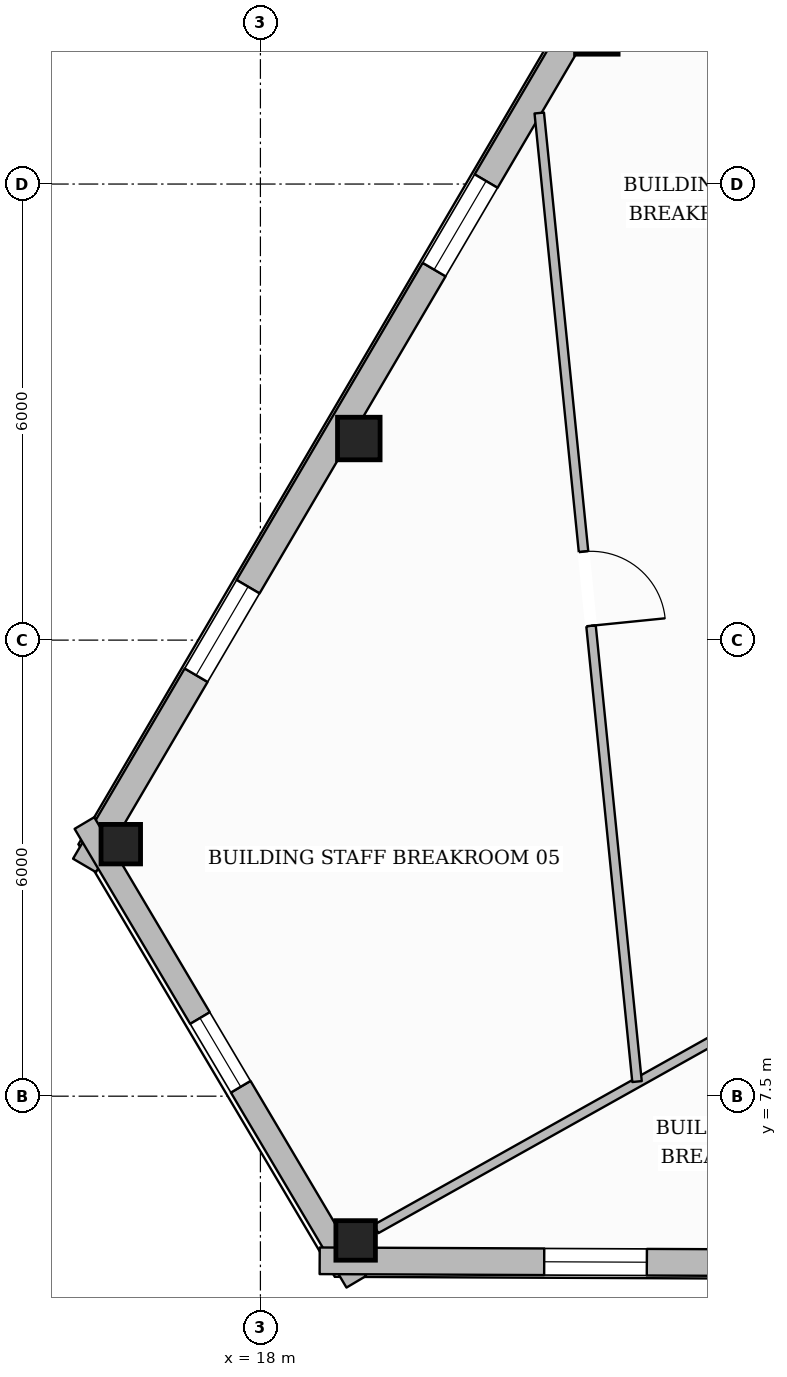
"""IFC4 building model, lengths in metres.
Left out: names, types, materials, properties, quantities, classifications, styles, units other than length and angle.
Written with IfcOpenShell. Run it as: python <this file> out.ifc"""

import sys

from ifc_helpers import new_model, si_unit, direction, frame, frame_2d, origin, origin_2d, place, context, subcontext, project, spatial, rectangle, hollow_rectangle, extrude, element, fill, save


model = new_model("IFC4")
c1 = context("Model", 3, precision=1e-05, world=origin(), true_north=direction((0.0, 1.0)))
c2 = subcontext(c1, "Body", "Model", "MODEL_VIEW")
j1 = project(units=[si_unit("LENGTHUNIT", "METRE"), si_unit("PLANEANGLEUNIT", "RADIAN")], contexts=[c1])
p1 = place(None, origin())
s1 = spatial("IfcSite", under=j1, at=p1, CompositionType="ELEMENT")
p2 = place(p1, origin())
s2 = spatial("IfcBuilding", under=s1, at=p2, CompositionType="ELEMENT")
p3 = place(p2, frame((0.0, 0.0, 270.3)))
s3 = spatial("IfcBuildingStorey", under=s2, at=p3, CompositionType="ELEMENT", Elevation=270.3)
for number, where, z_axis, x_axis in (
    (1, (22.426, 21.489, 0.0), (0.0, 0.0, 1.0), (1.0, 0.0, 0.0)),
    (2, (19.295, 16.152, 0.0), (0.0, 0.0, 1.0), (1.0, 0.0, 0.0)),
):
    element("IfcColumn", number, at=place(p3, frame(where, z_axis=z_axis, x_axis=x_axis)), inside=s3, PredefinedType="COLUMN", context=c2, shape_type="SweptSolid", body=[
        extrude(hollow_rectangle(XDim=0.56, YDim=0.56, WallThickness=0.025, at=origin_2d()), origin(), (0.0, 0.0, 1.0), 3.61),
    ])
for number, where, z_axis, x_axis in (
    (3, (16.163, 10.816, 0.0), (0.0, 0.0, 1.0), (1.0, 0.0, 0.0)),
    (4, (19.253, 5.602, 0.0), (0.0, 0.0, 1.0), (1.0, 0.0, 0.0)),
):
    element("IfcColumn", number, at=place(p3, frame(where, z_axis=z_axis, x_axis=x_axis)), inside=s3, PredefinedType="COLUMN", context=c2, shape_type="SweptSolid", body=[
        extrude(hollow_rectangle(XDim=0.52, YDim=0.52, WallThickness=0.024, at=origin_2d()), origin(), (0.0, 0.0, 1.0), 3.61),
    ])
p4 = place(p3, frame((15.686, 10.536, 0.0), z_axis=(0.0, 0.0, 1.0), x_axis=(0.506100645038, 0.862474426921, 0.0)))
e5 = element("IfcWall", 5, at=p4, inside=s3, PredefinedType="STANDARD", context=c2, shape_type="SweptSolid", body=[
    extrude(rectangle(XDim=38.084, YDim=0.35, at=frame_2d((19.042, 0.0))), origin(), (0.0, 0.0, 1.0), 3.196),
])
p5 = place(p4, frame((27.963, 0.0, 0.0)))
e6 = element("IfcOpeningElement", 6, at=p5, cuts=e5, PredefinedType="OPENING", context=c2, shape_type="SweptSolid", body=[
    extrude(rectangle(XDim=1.0, YDim=2.2, at=frame_2d((0.5, 1.1))), frame((0.0, 0.185, 0.0), z_axis=(0.0, -1.0, 0.0), x_axis=(1.0, 0.0, 0.0)), (0.0, 0.0, 1.0), 0.37),
])
p6 = place(p4, frame((33.839, 0.0, 0.65)))
e7 = element("IfcOpeningElement", 7, at=p6, cuts=e5, PredefinedType="OPENING", context=c2, shape_type="SweptSolid", body=[
    extrude(rectangle(XDim=1.35, YDim=1.75, at=frame_2d((0.675, 0.875))), frame((0.0, 0.185, 0.0), z_axis=(0.0, -1.0, 0.0), x_axis=(1.0, 0.0, 0.0)), (0.0, 0.0, 1.0), 0.37),
])
p7 = place(p4, frame((21.464, 0.0, 0.65)))
e8 = element("IfcOpeningElement", 8, at=p7, cuts=e5, PredefinedType="OPENING", context=c2, shape_type="SweptSolid", body=[
    extrude(rectangle(XDim=1.35, YDim=1.75, at=frame_2d((0.675, 0.875))), frame((0.0, 0.185, 0.0), z_axis=(0.0, -1.0, 0.0), x_axis=(1.0, 0.0, 0.0)), (0.0, 0.0, 1.0), 0.37),
])
p8 = place(p4, frame((9.089, 0.0, 0.65)))
e9 = element("IfcOpeningElement", 9, at=p8, cuts=e5, PredefinedType="OPENING", context=c2, shape_type="SweptSolid", body=[
    extrude(rectangle(XDim=1.35, YDim=1.75, at=frame_2d((0.675, 0.875))), frame((0.0, 0.185, 0.0), z_axis=(0.0, -1.0, 0.0), x_axis=(1.0, 0.0, 0.0)), (0.0, 0.0, 1.0), 0.37),
])
p9 = place(p4, frame((2.902, 0.0, 0.65)))
e10 = element("IfcOpeningElement", 10, at=p9, cuts=e5, PredefinedType="OPENING", context=c2, shape_type="SweptSolid", body=[
    extrude(rectangle(XDim=1.35, YDim=1.75, at=frame_2d((0.675, 0.875))), frame((0.0, 0.185, 0.0), z_axis=(0.0, -1.0, 0.0), x_axis=(1.0, 0.0, 0.0)), (0.0, 0.0, 1.0), 0.37),
])
p10 = place(p3, frame((19.261, 5.059, 0.0), z_axis=(0.0, 0.0, 1.0), x_axis=(-0.509846271697, 0.860265528332, 0.0)))
e11 = element("IfcWall", 11, at=p10, inside=s3, PredefinedType="STANDARD", context=c2, shape_type="SweptSolid", body=[
    extrude(rectangle(XDim=7.015, YDim=0.3, at=frame_2d((3.508, 0.0))), origin(), (0.0, 0.0, 1.0), 3.196),
])
p11 = place(p10, frame((2.983, 0.0, 0.65)))
e12 = element("IfcOpeningElement", 12, at=p11, cuts=e11, PredefinedType="OPENING", context=c2, shape_type="SweptSolid", body=[
    extrude(rectangle(XDim=1.05, YDim=1.7, at=frame_2d((0.525, 0.85))), frame((0.0, 0.16, 0.0), z_axis=(0.0, -1.0, 0.0), x_axis=(1.0, 0.0, 0.0)), (0.0, 0.0, 1.0), 0.32),
])
p12 = place(p3, frame((57.613, 5.165, 0.0), z_axis=(0.0, 0.0, 1.0), x_axis=(-0.99999050908, 0.004356805123, 0.0)))
e13 = element("IfcWall", 13, at=p12, inside=s3, PredefinedType="STANDARD", context=c2, shape_type="SweptSolid", body=[
    extrude(rectangle(XDim=38.833, YDim=0.35, at=frame_2d((19.417, 0.0))), origin(), (0.0, 0.0, 1.0), 3.196),
])
p13 = place(p12, frame((34.529, 0.0, 0.65)))
e14 = element("IfcOpeningElement", 14, at=p13, cuts=e13, PredefinedType="OPENING", context=c2, shape_type="SweptSolid", body=[
    extrude(rectangle(XDim=1.35, YDim=1.75, at=frame_2d((0.675, 0.875))), frame((0.0, 0.185, 0.0), z_axis=(0.0, -1.0, 0.0), x_axis=(1.0, 0.0, 0.0)), (0.0, 0.0, 1.0), 0.37),
])
p14 = place(p12, frame((28.215, 0.0, 0.65)))
e15 = element("IfcOpeningElement", 15, at=p14, cuts=e13, PredefinedType="OPENING", context=c2, shape_type="SweptSolid", body=[
    extrude(rectangle(XDim=1.35, YDim=1.75, at=frame_2d((0.675, 0.875))), frame((0.0, 0.185, 0.0), z_axis=(0.0, -1.0, 0.0), x_axis=(1.0, 0.0, 0.0)), (0.0, 0.0, 1.0), 0.37),
])
p15 = place(p12, frame((21.901, 0.0, 0.65)))
e16 = element("IfcOpeningElement", 16, at=p15, cuts=e13, PredefinedType="OPENING", context=c2, shape_type="SweptSolid", body=[
    extrude(rectangle(XDim=1.35, YDim=1.75, at=frame_2d((0.675, 0.875))), frame((0.0, 0.185, 0.0), z_axis=(0.0, -1.0, 0.0), x_axis=(1.0, 0.0, 0.0)), (0.0, 0.0, 1.0), 0.37),
])
p16 = place(p12, frame((9.272, 0.0, 0.65)))
e17 = element("IfcOpeningElement", 17, at=p16, cuts=e13, PredefinedType="OPENING", context=c2, shape_type="SweptSolid", body=[
    extrude(rectangle(XDim=1.35, YDim=1.75, at=frame_2d((0.675, 0.875))), frame((0.0, 0.185, 0.0), z_axis=(0.0, -1.0, 0.0), x_axis=(1.0, 0.0, 0.0)), (0.0, 0.0, 1.0), 0.37),
])
p17 = place(p12, frame((2.958, 0.0, 0.65)))
e18 = element("IfcOpeningElement", 18, at=p17, cuts=e13, PredefinedType="OPENING", context=c2, shape_type="SweptSolid", body=[
    extrude(rectangle(XDim=1.35, YDim=1.75, at=frame_2d((0.675, 0.875))), frame((0.0, 0.185, 0.0), z_axis=(0.0, -1.0, 0.0), x_axis=(1.0, 0.0, 0.0)), (0.0, 0.0, 1.0), 0.37),
])
p18 = place(p3, frame((26.01, 9.386, 0.0), z_axis=(0.0, 0.0, 1.0), x_axis=(-0.872521690704, -0.488575377246, 0.0)))
e19 = element("IfcWall", 19, at=p18, inside=s3, PredefinedType="PARTITIONING", context=c2, shape_type="SweptSolid", body=[
    extrude(rectangle(XDim=7.437, YDim=0.125, at=frame_2d((3.718, 0.0))), origin(), (0.0, 0.0, 1.0), 3.246),
])
p19 = place(p3, frame((21.669, 20.435, 0.0), z_axis=(0.0, 0.0, 1.0), x_axis=(0.100422843379, -0.994944848988, 0.0)))
e20 = element("IfcWall", 20, at=p19, inside=s3, PredefinedType="PARTITIONING", context=c2, shape_type="SweptSolid", body=[
    extrude(rectangle(XDim=12.807, YDim=0.125, at=frame_2d((6.404, 0.0))), origin(), (0.0, 0.0, 1.0), 3.349),
])
p20 = place(p19, frame((5.8, 0.0, 0.0)))
e21 = element("IfcOpeningElement", 21, at=p20, cuts=e20, PredefinedType="OPENING", context=c2, shape_type="SweptSolid", body=[
    extrude(rectangle(XDim=0.98, YDim=2.15, at=frame_2d((0.49, 1.075))), frame((0.0, 0.073, 0.0), z_axis=(0.0, -1.0, 0.0), x_axis=(1.0, 0.0, 0.0)), (0.0, 0.0, 1.0), 0.145),
])
p21 = place(p8, origin())
e22 = element("IfcWindow", 22, at=p21, inside=s3, PartitioningType="SINGLE_PANEL", PredefinedType="WINDOW", context=c2, shape_type="SweptSolid", body=[
    extrude(rectangle(XDim=1.35, YDim=1.75, at=frame_2d((0.675, 0.875))), frame((0.0, 0.03, 0.0), z_axis=(0.0, -1.0, 0.0), x_axis=(1.0, 0.0, 0.0)), (0.0, 0.0, 1.0), 0.06),
])
fill(e9, e22)
p22 = place(p9, origin())
e23 = element("IfcWindow", 23, at=p22, inside=s3, PartitioningType="SINGLE_PANEL", PredefinedType="WINDOW", context=c2, shape_type="SweptSolid", body=[
    extrude(rectangle(XDim=1.35, YDim=1.75, at=frame_2d((0.675, 0.875))), frame((0.0, 0.03, 0.0), z_axis=(0.0, -1.0, 0.0), x_axis=(1.0, 0.0, 0.0)), (0.0, 0.0, 1.0), 0.06),
])
fill(e10, e23)
p23 = place(p13, origin())
e24 = element("IfcWindow", 24, at=p23, inside=s3, PartitioningType="SINGLE_PANEL", PredefinedType="WINDOW", context=c2, shape_type="SweptSolid", body=[
    extrude(rectangle(XDim=1.35, YDim=1.75, at=frame_2d((0.675, 0.875))), frame((0.0, 0.03, 0.0), z_axis=(0.0, -1.0, 0.0), x_axis=(1.0, 0.0, 0.0)), (0.0, 0.0, 1.0), 0.06),
])
fill(e14, e24)
p24 = place(p11, origin())
e25 = element("IfcWindow", 25, at=p24, inside=s3, PartitioningType="SINGLE_PANEL", PredefinedType="WINDOW", context=c2, shape_type="SweptSolid", body=[
    extrude(rectangle(XDim=1.05, YDim=1.7, at=frame_2d((0.525, 0.85))), frame((0.0, 0.03, 0.0), z_axis=(0.0, -1.0, 0.0), x_axis=(1.0, 0.0, 0.0)), (0.0, 0.0, 1.0), 0.06),
])
fill(e12, e25)
p25 = place(p20, origin())
e26 = element("IfcDoor", 26, at=p25, inside=s3, OperationType="SINGLE_SWING_RIGHT", PredefinedType="DOOR", context=c2, shape_type="SweptSolid", body=[
    extrude(rectangle(XDim=0.98, YDim=2.15, at=frame_2d((0.49, 1.075))), frame((0.0, 0.025, 0.0), z_axis=(0.0, -1.0, 0.0), x_axis=(1.0, 0.0, 0.0)), (0.0, 0.0, 1.0), 0.05),
])
fill(e21, e26)
save(model, sys.argv[1])
